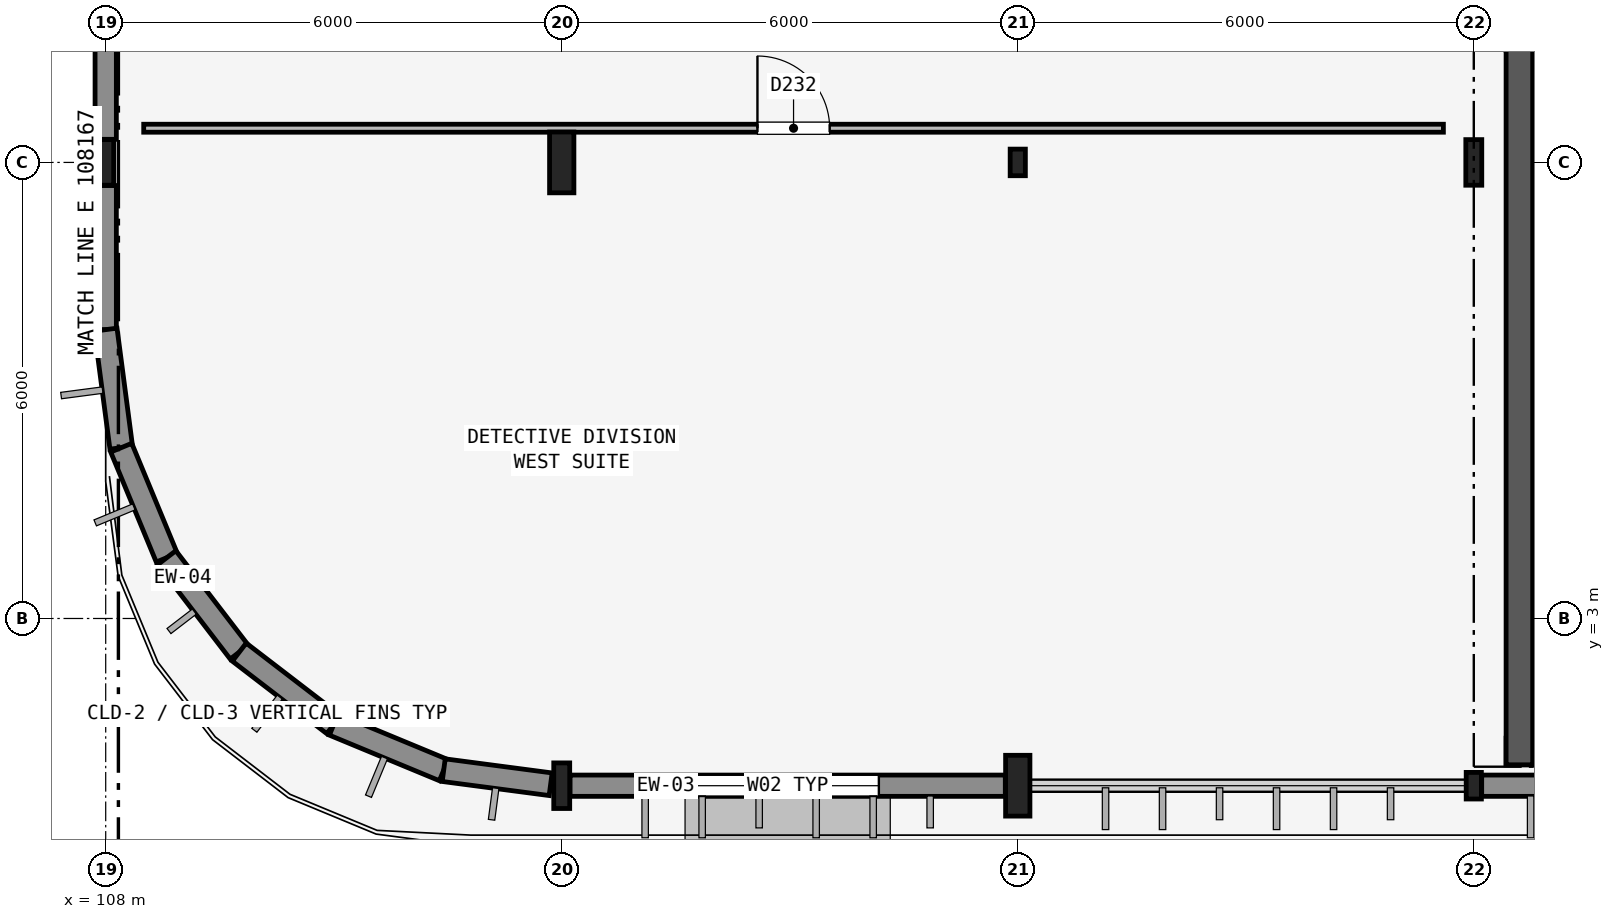
"""IFC4 building model, lengths in metres.
Left out: names, types, materials, properties, quantities, classifications, styles, units other than length and angle.
Written with IfcOpenShell. Run it as: python <this file> out.ifc"""

import sys

from ifc_helpers import new_model, si_unit, direction, frame, frame_2d, origin, origin_2d, place, context, subcontext, project, spatial, rectangle, hollow_rectangle, i_section, extrude, element, fill, save


model = new_model("IFC4")
c1 = context("Model", 3, precision=1e-05, world=origin(), true_north=direction((0.0, 1.0)))
c2 = subcontext(c1, "Body", "Model", "MODEL_VIEW")
j1 = project(units=[si_unit("LENGTHUNIT", "METRE"), si_unit("PLANEANGLEUNIT", "RADIAN")], contexts=[c1])
p1 = place(None, origin())
s1 = spatial("IfcSite", under=j1, at=p1, CompositionType="ELEMENT")
p2 = place(p1, origin())
s2 = spatial("IfcBuilding", under=s1, at=p2, CompositionType="ELEMENT")
p3 = place(p2, frame((0.0, 0.0, 9.3)))
s3 = spatial("IfcBuildingStorey", under=s2, at=p3, CompositionType="ELEMENT", Elevation=9.3)
for number, where, z_axis, x_axis in (
    (1, (108.0, 9.0, 0.0), (0.0, 0.0, 1.0), (1.0, 0.0, 0.0)),
    (2, (114.0, 0.8, 0.0), (0.0, 0.0, 1.0), (1.0, 0.0, 0.0)),
):
    element("IfcColumn", number, at=place(p3, frame(where, z_axis=z_axis, x_axis=x_axis)), inside=s3, PredefinedType="COLUMN", context=c2, shape_type="SweptSolid", body=[
        extrude(i_section(OverallWidth=0.21, OverallDepth=0.6, WebThickness=0.012, FlangeThickness=0.021, FilletRadius=0.02, at=origin_2d()), origin(), (0.0, 0.0, 1.0), 4.2),
    ])
for number, where, z_axis, x_axis in (
    (3, (114.0, 9.0, 0.0), (0.0, 0.0, 1.0), (1.0, 0.0, 0.0)),
    (4, (120.0, 0.8, 0.0), (0.0, 0.0, 1.0), (1.0, 0.0, 0.0)),
):
    element("IfcColumn", number, at=place(p3, frame(where, z_axis=z_axis, x_axis=x_axis)), inside=s3, PredefinedType="COLUMN", context=c2, shape_type="SweptSolid", body=[
        extrude(i_section(OverallWidth=0.32, OverallDepth=0.8, WebThickness=0.016, FlangeThickness=0.028, at=origin_2d()), origin(), (0.0, 0.0, 1.0), 4.2),
    ])
for number, where, z_axis, x_axis in (
    (5, (120.0, 9.0, 0.0), (0.0, 0.0, 1.0), (1.0, 0.0, 0.0)),
    (6, (126.0, 0.8, 0.0), (0.0, 0.0, 1.0), (1.0, 0.0, 0.0)),
):
    element("IfcColumn", number, at=place(p3, frame(where, z_axis=z_axis, x_axis=x_axis)), inside=s3, PredefinedType="COLUMN", context=c2, shape_type="SweptSolid", body=[
        extrude(hollow_rectangle(XDim=0.2, YDim=0.35, WallThickness=0.012, InnerFilletRadius=0.012, OuterFilletRadius=0.024, at=origin_2d()), origin(), (0.0, 0.0, 1.0), 4.2),
    ])
p4 = place(p3, frame((126.0, 9.0, 0.0), z_axis=(0.0, 0.0, 1.0), x_axis=(1.0, 0.0, 0.0)))
e7 = element("IfcColumn", 7, at=p4, inside=s3, PredefinedType="COLUMN", context=c2, shape_type="SweptSolid", body=[
    extrude(i_section(OverallWidth=0.21, OverallDepth=0.6, WebThickness=0.012, FlangeThickness=0.021, FilletRadius=0.02, at=origin_2d()), origin(), (0.0, 0.0, 1.0), 4.2),
])
p5 = place(p3, frame((114.109, 0.8, 0.0), z_axis=(0.0, 0.0, 1.0), x_axis=(1.0, 0.0, 0.0)))
e8 = element("IfcWall", 8, at=p5, inside=s3, PredefinedType="SOLIDWALL", context=c2, shape_type="SweptSolid", body=[
    extrude(rectangle(XDim=5.727, YDim=0.28, at=frame_2d((2.864, 0.0))), origin(), (0.0, 0.0, 1.0), 3.484),
])
p6 = place(p5, frame((1.664, 0.0, 0.9)))
e9 = element("IfcOpeningElement", 9, at=p6, cuts=e8, PredefinedType="OPENING", context=c2, shape_type="SweptSolid", body=[
    extrude(rectangle(XDim=2.4, YDim=1.5, at=frame_2d((1.2, 0.75))), frame((0.0, 0.15, 0.0), z_axis=(0.0, -1.0, 0.0), x_axis=(1.0, 0.0, 0.0)), (0.0, 0.0, 1.0), 0.3),
])
p7 = place(p3, frame((126.104, 0.8, 0.0), z_axis=(0.0, 0.0, 1.0), x_axis=(1.0, 0.0, 0.0)))
e10 = element("IfcWall", 10, at=p7, inside=s3, PredefinedType="SOLIDWALL", context=c2, shape_type="SweptSolid", body=[
    extrude(rectangle(XDim=5.787, YDim=0.28, at=frame_2d((2.894, 0.0))), origin(), (0.0, 0.0, 1.0), 3.484),
])
p8 = place(p3, frame((108.0, 6.8, 0.0), z_axis=(0.0, 0.0, 1.0), x_axis=(0.0, 1.0, 0.0)))
e11 = element("IfcWall", 11, at=p8, inside=s3, PredefinedType="SOLIDWALL", context=c2, shape_type="SweptSolid", body=[
    extrude(rectangle(XDim=1.896, YDim=0.28, at=frame_2d((0.948, 0.0))), origin(), (0.0, 0.0, 1.0), 3.566),
])
p9 = place(p3, frame((108.0, 9.304, 0.0), z_axis=(0.0, 0.0, 1.0), x_axis=(0.0, 1.0, 0.0)))
e12 = element("IfcWall", 12, at=p9, inside=s3, PredefinedType="SOLIDWALL", context=c2, shape_type="SweptSolid", body=[
    extrude(rectangle(XDim=5.292, YDim=0.28, at=frame_2d((2.646, 0.0))), origin(), (0.0, 0.0, 1.0), 3.566),
])
p10 = place(p9, frame((1.596, 0.0, 0.9)))
e13 = element("IfcOpeningElement", 13, at=p10, cuts=e12, PredefinedType="OPENING", context=c2, shape_type="SweptSolid", body=[
    extrude(rectangle(XDim=2.1, YDim=1.5, at=frame_2d((1.05, 0.75))), frame((0.0, 0.15, 0.0), z_axis=(0.0, -1.0, 0.0), x_axis=(1.0, 0.0, 0.0)), (0.0, 0.0, 1.0), 0.3),
])
p11 = place(p3, frame((108.0, 6.8, 0.0), z_axis=(0.0, 0.0, 1.0), x_axis=(0.130458544462, -0.991453765022, 0.0)))
e14 = element("IfcWall", 14, at=p11, inside=s3, PredefinedType="SOLIDWALL", context=c2, shape_type="SweptSolid", body=[
    extrude(rectangle(XDim=1.566, YDim=0.3, at=frame_2d((0.783, 0.0))), origin(), (0.0, 0.0, 1.0), 3.895),
])
p12 = place(p3, frame((108.204, 5.247, 0.0), z_axis=(0.0, 0.0, 1.0), x_axis=(0.382677606907, -0.923881945474, 0.0)))
e15 = element("IfcWall", 15, at=p12, inside=s3, PredefinedType="SOLIDWALL", context=c2, shape_type="SweptSolid", body=[
    extrude(rectangle(XDim=1.566, YDim=0.3, at=frame_2d((0.783, 0.0))), origin(), (0.0, 0.0, 1.0), 3.895),
])
for number, where, z_axis, x_axis in (
    (16, (108.804, 3.8, 0.0), (0.0, 0.0, 1.0), (0.609, -0.793, 0.0)),
    (17, (109.757, 2.557, 0.0), (0.0, 0.0, 1.0), (0.793, -0.609, 0.0)),
):
    element("IfcWall", number, at=place(p3, frame(where, z_axis=z_axis, x_axis=x_axis)), inside=s3, PredefinedType="SOLIDWALL", context=c2, shape_type="SweptSolid", body=[
        extrude(rectangle(XDim=1.566, YDim=0.3, at=frame_2d((0.783, 0.0))), origin(), (0.0, 0.0, 1.0), 3.895),
    ])
p13 = place(p3, frame((111.0, 1.604, 0.0), z_axis=(0.0, 0.0, 1.0), x_axis=(0.923881945474, -0.382677606907, 0.0)))
e18 = element("IfcWall", 18, at=p13, inside=s3, PredefinedType="SOLIDWALL", context=c2, shape_type="SweptSolid", body=[
    extrude(rectangle(XDim=1.566, YDim=0.3, at=frame_2d((0.783, 0.0))), origin(), (0.0, 0.0, 1.0), 3.895),
])
p14 = place(p3, frame((112.447, 1.004, 0.0), z_axis=(0.0, 0.0, 1.0), x_axis=(0.991438478362, -0.130574666853, 0.0)))
e19 = element("IfcWall", 19, at=p14, inside=s3, PredefinedType="SOLIDWALL", context=c2, shape_type="SweptSolid", body=[
    extrude(rectangle(XDim=1.419, YDim=0.3, at=frame_2d((0.709, 0.0))), origin(), (0.0, 0.0, 1.0), 3.484),
])
p15 = place(p3, frame((126.425, 1.25, 0.0), z_axis=(0.0, 0.0, 1.0), x_axis=(1.0, 0.0, 0.0)))
e20 = element("IfcWall", 20, at=p15, inside=s3, PredefinedType="SHEAR", context=c2, shape_type="SweptSolid", body=[
    extrude(rectangle(XDim=5.15, YDim=0.35, at=frame_2d((2.575, 0.0))), origin(), (0.0, 0.0, 1.0), 4.06),
])
p16 = place(p3, frame((126.6, 10.825, 0.0), z_axis=(0.0, 0.0, 1.0), x_axis=(0.0, -1.0, 0.0)))
e21 = element("IfcWall", 21, at=p16, inside=s3, PredefinedType="SHEAR", context=c2, shape_type="SweptSolid", body=[
    extrude(rectangle(XDim=9.75, YDim=0.35, at=frame_2d((4.875, 0.0))), origin(), (0.0, 0.0, 1.0), 4.06),
])
p17 = place(p3, frame((108.5, 9.45, 0.0), z_axis=(0.0, 0.0, 1.0), x_axis=(1.0, 0.0, 0.0)))
e22 = element("IfcWall", 22, at=p17, inside=s3, PredefinedType="PARTITIONING", context=c2, shape_type="SweptSolid", body=[
    extrude(rectangle(XDim=17.1, YDim=0.105, at=frame_2d((8.55, 0.0))), origin(), (0.0, 0.0, 1.0), 3.49),
])
p18 = place(p17, frame((8.075, 0.0, 0.0)))
e23 = element("IfcOpeningElement", 23, at=p18, cuts=e22, PredefinedType="OPENING", context=c2, shape_type="SweptSolid", body=[
    extrude(rectangle(XDim=0.95, YDim=2.15, at=frame_2d((0.475, 1.075))), frame((0.0, 0.062, 0.0), z_axis=(0.0, -1.0, 0.0), x_axis=(1.0, 0.0, 0.0)), (0.0, 0.0, 1.0), 0.125),
])
p19 = place(p6, origin())
e24 = element("IfcWindow", 24, at=p19, inside=s3, PartitioningType="SINGLE_PANEL", PredefinedType="WINDOW", context=c2, shape_type="SweptSolid", body=[
    extrude(rectangle(XDim=2.4, YDim=1.5, at=frame_2d((1.2, 0.75))), frame((0.0, 0.03, 0.0), z_axis=(0.0, -1.0, 0.0), x_axis=(1.0, 0.0, 0.0)), (0.0, 0.0, 1.0), 0.06),
])
fill(e9, e24)
p20 = place(p18, origin())
e25 = element("IfcDoor", 25, at=p20, inside=s3, OperationType="SINGLE_SWING_LEFT", PredefinedType="DOOR", context=c2, shape_type="SweptSolid", body=[
    extrude(rectangle(XDim=0.95, YDim=2.15, at=frame_2d((0.475, 1.075))), frame((0.0, 0.025, 0.0), z_axis=(0.0, -1.0, 0.0), x_axis=(1.0, 0.0, 0.0)), (0.0, 0.0, 1.0), 0.05),
])
fill(e23, e25)
save(model, sys.argv[1])
